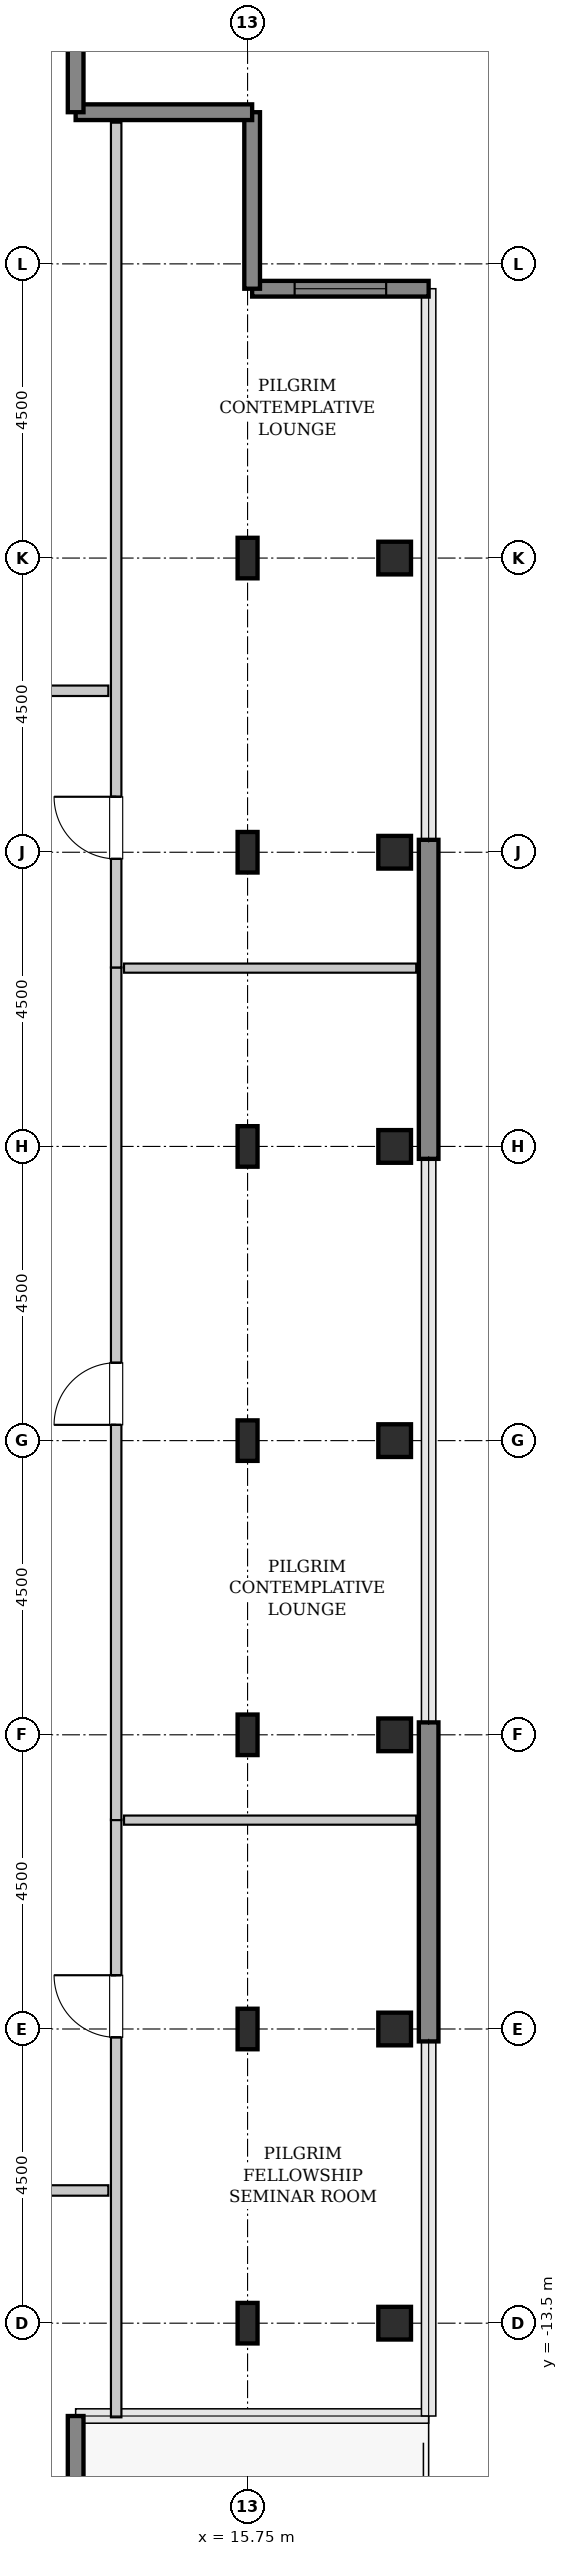
"""IFC4 building model, lengths in metres.
Left out: names, types, materials, properties, quantities, classifications, styles, units other than length and angle.
Written with IfcOpenShell. Run it as: python <this file> out.ifc"""

import sys

from ifc_helpers import new_model, si_unit, direction, frame, frame_2d, origin, origin_2d, place, context, subcontext, project, spatial, rectangle, hollow_rectangle, i_section, extrude, source, transform, mapped, element, fill, save


model = new_model("IFC4")
c1 = context("Model", 3, precision=1e-05, world=origin(), true_north=direction((0.0, 1.0)))
c2 = subcontext(c1, "Body", "Model", "MODEL_VIEW")
j1 = project(units=[si_unit("LENGTHUNIT", "METRE"), si_unit("PLANEANGLEUNIT", "RADIAN")], contexts=[c1])
p1 = place(None, origin())
s1 = spatial("IfcSite", under=j1, at=p1, CompositionType="ELEMENT")
p2 = place(p1, origin())
s2 = spatial("IfcBuilding", under=s1, at=p2, CompositionType="ELEMENT")
p3 = place(p2, frame((0.0, 0.0, 298.8)))
s3 = spatial("IfcBuildingStorey", under=s2, at=p3, CompositionType="ELEMENT", Elevation=298.8)
m1 = source(origin(), c2, "Body", "SweptSolid", [
    extrude(i_section(OverallWidth=0.305, OverallDepth=0.62, WebThickness=0.021, FlangeThickness=0.04, FilletRadius=0.027, at=origin_2d()), origin(), (0.0, 0.0, 1.0), 3.8),
])
for number, where, z_axis, x_axis in (
    (1, (15.75, -13.5, 0.0), (0.0, 0.0, 1.0), (1.0, 0.0, 0.0)),
    (2, (15.75, -9.0, 0.0), (0.0, 0.0, 1.0), (1.0, 0.0, 0.0)),
    (3, (15.75, -4.5, 0.0), (0.0, 0.0, 1.0), (1.0, 0.0, 0.0)),
    (4, (15.75, 0.0, 0.0), (0.0, 0.0, 1.0), (1.0, 0.0, 0.0)),
    (5, (15.75, 4.5, 0.0), (0.0, 0.0, 1.0), (1.0, 0.0, 0.0)),
    (6, (15.75, 9.0, 0.0), (0.0, 0.0, 1.0), (1.0, 0.0, 0.0)),
    (7, (15.75, 13.5, 0.0), (0.0, 0.0, 1.0), (1.0, 0.0, 0.0)),
):
    element("IfcColumn", number, at=place(p3, frame(where, z_axis=z_axis, x_axis=x_axis)), inside=s3, PredefinedType="COLUMN", context=c2, shape_type="MappedRepresentation", body=[
        mapped(m1, transform((0.0, 0.0, 0.0), x_axis=(1.0, 0.0, 0.0), y_axis=(0.0, 1.0, 0.0), z_axis=(0.0, 0.0, 1.0), scale=1.0)),
    ])
m2 = source(origin(), c2, "Body", "SweptSolid", [
    extrude(hollow_rectangle(XDim=0.5, YDim=0.5, WallThickness=0.025, InnerFilletRadius=0.025, OuterFilletRadius=0.05, at=origin_2d()), origin(), (0.0, 0.0, 1.0), 3.8),
])
for number, where, z_axis, x_axis in (
    (8, (18.0, -13.5, 0.0), (0.0, 0.0, 1.0), (1.0, 0.0, 0.0)),
    (9, (18.0, -9.0, 0.0), (0.0, 0.0, 1.0), (1.0, 0.0, 0.0)),
    (10, (18.0, -4.5, 0.0), (0.0, 0.0, 1.0), (1.0, 0.0, 0.0)),
    (11, (18.0, 0.0, 0.0), (0.0, 0.0, 1.0), (1.0, 0.0, 0.0)),
    (12, (18.0, 4.5, 0.0), (0.0, 0.0, 1.0), (1.0, 0.0, 0.0)),
    (13, (18.0, 9.0, 0.0), (0.0, 0.0, 1.0), (1.0, 0.0, 0.0)),
    (14, (18.0, 13.5, 0.0), (0.0, 0.0, 1.0), (1.0, 0.0, 0.0)),
):
    element("IfcColumn", number, at=place(p3, frame(where, z_axis=z_axis, x_axis=x_axis)), inside=s3, PredefinedType="COLUMN", context=c2, shape_type="MappedRepresentation", body=[
        mapped(m2, transform((0.0, 0.0, 0.0), x_axis=(1.0, 0.0, 0.0), y_axis=(0.0, 1.0, 0.0), z_axis=(0.0, 0.0, 1.0), scale=1.0)),
    ])
m3 = source(origin(), c2, "Body", "SweptSolid", [
    extrude(rectangle(XDim=4.88, YDim=0.3, at=frame_2d((2.44, 0.0))), origin(), (0.0, 0.0, 1.0), 3.55),
])
for number, where, z_axis, x_axis in (
    (15, (18.52, -9.19, 0.0), (0.0, 0.0, 1.0), (0.0, 1.0, 0.0)),
    (16, (18.52, 4.31, 0.0), (0.0, 0.0, 1.0), (0.0, 1.0, 0.0)),
):
    element("IfcWall", number, at=place(p3, frame(where, z_axis=z_axis, x_axis=x_axis)), inside=s3, PredefinedType="SHEAR", context=c2, shape_type="MappedRepresentation", body=[
        mapped(m3, transform((0.0, 0.0, 0.0), x_axis=(1.0, 0.0, 0.0), y_axis=(0.0, 1.0, 0.0), z_axis=(0.0, 0.0, 1.0), scale=1.0)),
    ])
m4 = source(origin(), c2, "Body", "SweptSolid", [
    extrude(rectangle(XDim=2.7, YDim=0.24, at=frame_2d((1.35, 0.0))), origin(), (0.0, 0.0, 1.0), 3.55),
])
p4 = place(p3, frame((13.12, -17.62, 0.0), z_axis=(0.0, 0.0, 1.0), x_axis=(0.0, 1.0, 0.0)))
e17 = element("IfcWall", 17, at=p4, inside=s3, PredefinedType="SHEAR", context=c2, shape_type="MappedRepresentation", body=[
    mapped(m4, transform((0.0, 0.0, 0.0), x_axis=(1.0, 0.0, 0.0), y_axis=(0.0, 1.0, 0.0), z_axis=(0.0, 0.0, 1.0), scale=1.0)),
])
m5 = source(origin(), c2, "Body", "SweptSolid", [
    extrude(rectangle(XDim=2.7, YDim=0.24, at=frame_2d((1.35, 0.0))), origin(), (0.0, 0.0, 1.0), 3.55),
])
p5 = place(p3, frame((18.52, 17.62, 0.0), z_axis=(0.0, 0.0, 1.0), x_axis=(-1.0, 0.0, 0.0)))
e18 = element("IfcWall", 18, at=p5, inside=s3, PredefinedType="SHEAR", context=c2, shape_type="MappedRepresentation", body=[
    mapped(m5, transform((0.0, 0.0, 0.0), x_axis=(1.0, 0.0, 0.0), y_axis=(0.0, 1.0, 0.0), z_axis=(0.0, 0.0, 1.0), scale=1.0)),
])
p6 = place(p5, frame((0.65, 0.0, 0.85)))
e19 = element("IfcOpeningElement", 19, at=p6, cuts=e18, PredefinedType="OPENING", context=c2, shape_type="SweptSolid", body=[
    extrude(rectangle(XDim=1.4, YDim=1.8, at=frame_2d((0.7, 0.9))), frame((0.0, 0.13, 0.0), z_axis=(0.0, -1.0, 0.0), x_axis=(1.0, 0.0, 0.0)), (0.0, 0.0, 1.0), 0.26),
])
for number, where, z_axis, x_axis in (
    (20, (15.82, 17.62, 0.0), (0.0, 0.0, 1.0), (0.0, 1.0, 0.0)),
    (21, (15.82, 20.32, 0.0), (0.0, 0.0, 1.0), (-1.0, 0.0, 0.0)),
    (22, (13.12, 20.32, 0.0), (0.0, 0.0, 1.0), (0.0, 1.0, 0.0)),
):
    element("IfcWall", number, at=place(p3, frame(where, z_axis=z_axis, x_axis=x_axis)), inside=s3, PredefinedType="SHEAR", context=c2, shape_type="MappedRepresentation", body=[
        mapped(m5, transform((0.0, 0.0, 0.0), x_axis=(1.0, 0.0, 0.0), y_axis=(0.0, 1.0, 0.0), z_axis=(0.0, 0.0, 1.0), scale=1.0)),
    ])
m6 = source(origin(), c2, "Body", "SweptSolid", [
    extrude(rectangle(XDim=9.145, YDim=0.16, at=frame_2d((4.573, 0.0))), origin(), (0.0, 0.0, 1.0), 3.535),
])
p7 = place(p3, frame((13.74, -14.94, 0.0), z_axis=(0.0, 0.0, 1.0), x_axis=(0.0, 1.0, 0.0)))
e23 = element("IfcWall", 23, at=p7, inside=s3, PredefinedType="PARTITIONING", context=c2, shape_type="MappedRepresentation", body=[
    mapped(m6, transform((0.0, 0.0, 0.0), x_axis=(1.0, 0.0, 0.0), y_axis=(0.0, 1.0, 0.0), z_axis=(0.0, 0.0, 1.0), scale=1.0)),
])
p8 = place(p7, frame((5.812, 0.0, 0.0)))
e24 = element("IfcOpeningElement", 24, at=p8, cuts=e23, PredefinedType="OPENING", context=c2, shape_type="SweptSolid", body=[
    extrude(rectangle(XDim=0.95, YDim=2.1, at=frame_2d((0.475, 1.05))), frame((0.0, 0.09, 0.0), z_axis=(0.0, -1.0, 0.0), x_axis=(1.0, 0.0, 0.0)), (0.0, 0.0, 1.0), 0.18),
])
m7 = source(origin(), c2, "Body", "SweptSolid", [
    extrude(rectangle(XDim=4.47, YDim=0.14, at=frame_2d((2.235, 0.0))), origin(), (0.0, 0.0, 1.0), 3.535),
])
p9 = place(p3, frame((13.86, -5.805, 0.0), z_axis=(0.0, 0.0, 1.0), x_axis=(1.0, 0.0, 0.0)))
e25 = element("IfcWall", 25, at=p9, inside=s3, PredefinedType="PARTITIONING", context=c2, shape_type="MappedRepresentation", body=[
    mapped(m7, transform((0.0, 0.0, 0.0), x_axis=(1.0, 0.0, 0.0), y_axis=(0.0, 1.0, 0.0), z_axis=(0.0, 0.0, 1.0), scale=1.0)),
])
m8 = source(origin(), c2, "Body", "SweptSolid", [
    extrude(rectangle(XDim=13.042, YDim=0.16, at=frame_2d((6.521, 0.0))), origin(), (0.0, 0.0, 1.0), 3.535),
])
p10 = place(p3, frame((13.74, -5.805, 0.0), z_axis=(0.0, 0.0, 1.0), x_axis=(0.0, 1.0, 0.0)))
e26 = element("IfcWall", 26, at=p10, inside=s3, PredefinedType="PARTITIONING", context=c2, shape_type="MappedRepresentation", body=[
    mapped(m8, transform((0.0, 0.0, 0.0), x_axis=(1.0, 0.0, 0.0), y_axis=(0.0, 1.0, 0.0), z_axis=(0.0, 0.0, 1.0), scale=1.0)),
])
p11 = place(p10, frame((6.046, 0.0, 0.0)))
e27 = element("IfcOpeningElement", 27, at=p11, cuts=e26, PredefinedType="OPENING", context=c2, shape_type="SweptSolid", body=[
    extrude(rectangle(XDim=0.95, YDim=2.1, at=frame_2d((0.475, 1.05))), frame((0.0, 0.09, 0.0), z_axis=(0.0, -1.0, 0.0), x_axis=(1.0, 0.0, 0.0)), (0.0, 0.0, 1.0), 0.18),
])
p12 = place(p3, frame((13.86, 7.228, 0.0), z_axis=(0.0, 0.0, 1.0), x_axis=(1.0, 0.0, 0.0)))
e28 = element("IfcWall", 28, at=p12, inside=s3, PredefinedType="PARTITIONING", context=c2, shape_type="MappedRepresentation", body=[
    mapped(m7, transform((0.0, 0.0, 0.0), x_axis=(1.0, 0.0, 0.0), y_axis=(0.0, 1.0, 0.0), z_axis=(0.0, 0.0, 1.0), scale=1.0)),
])
m9 = source(origin(), c2, "Body", "SweptSolid", [
    extrude(rectangle(XDim=12.922, YDim=0.16, at=frame_2d((6.461, 0.0))), origin(), (0.0, 0.0, 1.0), 3.535),
])
p13 = place(p3, frame((13.74, 7.238, 0.0), z_axis=(0.0, 0.0, 1.0), x_axis=(0.0, 1.0, 0.0)))
e29 = element("IfcWall", 29, at=p13, inside=s3, PredefinedType="PARTITIONING", context=c2, shape_type="MappedRepresentation", body=[
    mapped(m9, transform((0.0, 0.0, 0.0), x_axis=(1.0, 0.0, 0.0), y_axis=(0.0, 1.0, 0.0), z_axis=(0.0, 0.0, 1.0), scale=1.0)),
])
p14 = place(p13, frame((1.661, 0.0, 0.0)))
e30 = element("IfcOpeningElement", 30, at=p14, cuts=e29, PredefinedType="OPENING", context=c2, shape_type="SweptSolid", body=[
    extrude(rectangle(XDim=0.95, YDim=2.1, at=frame_2d((0.475, 1.05))), frame((0.0, 0.09, 0.0), z_axis=(0.0, -1.0, 0.0), x_axis=(1.0, 0.0, 0.0)), (0.0, 0.0, 1.0), 0.18),
])
m10 = source(origin(), c2, "Body", "SweptSolid", [
    extrude(rectangle(XDim=5.225, YDim=0.16, at=frame_2d((2.613, 0.0))), origin(), (0.0, 0.0, 1.0), 3.535),
])
p15 = place(p3, frame((8.395, 11.47, 0.0), z_axis=(0.0, 0.0, 1.0), x_axis=(1.0, 0.0, 0.0)))
e31 = element("IfcWall", 31, at=p15, inside=s3, PredefinedType="PARTITIONING", context=c2, shape_type="MappedRepresentation", body=[
    mapped(m10, transform((0.0, 0.0, 0.0), x_axis=(1.0, 0.0, 0.0), y_axis=(0.0, 1.0, 0.0), z_axis=(0.0, 0.0, 1.0), scale=1.0)),
])
p16 = place(p15, frame((2.137, 0.0, 0.0)))
e32 = element("IfcOpeningElement", 32, at=p16, cuts=e31, PredefinedType="OPENING", context=c2, shape_type="SweptSolid", body=[
    extrude(rectangle(XDim=0.95, YDim=2.1, at=frame_2d((0.475, 1.05))), frame((0.0, 0.09, 0.0), z_axis=(0.0, -1.0, 0.0), x_axis=(1.0, 0.0, 0.0)), (0.0, 0.0, 1.0), 0.18),
])
m11 = source(origin(), c2, "Body", "SweptSolid", [
    extrude(rectangle(XDim=7.225, YDim=0.16, at=frame_2d((3.613, 0.0))), origin(), (0.0, 0.0, 1.0), 3.535),
])
p17 = place(p3, frame((6.395, -11.47, 0.0), z_axis=(0.0, 0.0, 1.0), x_axis=(1.0, 0.0, 0.0)))
e33 = element("IfcWall", 33, at=p17, inside=s3, PredefinedType="PARTITIONING", context=c2, shape_type="MappedRepresentation", body=[
    mapped(m11, transform((0.0, 0.0, 0.0), x_axis=(1.0, 0.0, 0.0), y_axis=(0.0, 1.0, 0.0), z_axis=(0.0, 0.0, 1.0), scale=1.0)),
])
p18 = place(p17, frame((3.137, 0.0, 0.0)))
e34 = element("IfcOpeningElement", 34, at=p18, cuts=e33, PredefinedType="OPENING", context=c2, shape_type="SweptSolid", body=[
    extrude(rectangle(XDim=0.95, YDim=2.1, at=frame_2d((0.475, 1.05))), frame((0.0, 0.09, 0.0), z_axis=(0.0, -1.0, 0.0), x_axis=(1.0, 0.0, 0.0)), (0.0, 0.0, 1.0), 0.18),
])
m12 = source(origin(), c2, "Body", "SweptSolid", [
    extrude(rectangle(XDim=1.4, YDim=1.8, at=frame_2d((0.7, 0.9))), frame((0.0, 0.03, 0.0), z_axis=(0.0, -1.0, 0.0), x_axis=(1.0, 0.0, 0.0)), (0.0, 0.0, 1.0), 0.06),
])
p19 = place(p6, origin())
e35 = element("IfcWindow", 35, at=p19, inside=s3, PartitioningType="SINGLE_PANEL", PredefinedType="WINDOW", context=c2, shape_type="MappedRepresentation", body=[
    mapped(m12, transform((0.0, 0.0, 0.0), x_axis=(1.0, 0.0, 0.0), y_axis=(0.0, 1.0, 0.0), z_axis=(0.0, 0.0, 1.0), scale=1.0)),
])
fill(e19, e35)
m13 = source(origin(), c2, "Body", "SweptSolid", [
    extrude(rectangle(XDim=0.95, YDim=2.1, at=frame_2d((0.475, 1.05))), frame((0.0, 0.025, 0.0), z_axis=(0.0, -1.0, 0.0), x_axis=(1.0, 0.0, 0.0)), (0.0, 0.0, 1.0), 0.05),
])
p20 = place(p8, origin())
e36 = element("IfcDoor", 36, at=p20, inside=s3, OperationType="SINGLE_SWING_RIGHT", PredefinedType="DOOR", context=c2, shape_type="MappedRepresentation", body=[
    mapped(m13, transform((0.0, 0.0, 0.0), x_axis=(1.0, 0.0, 0.0), y_axis=(0.0, 1.0, 0.0), z_axis=(0.0, 0.0, 1.0), scale=1.0)),
])
fill(e24, e36)
p21 = place(p11, origin())
e37 = element("IfcDoor", 37, at=p21, inside=s3, OperationType="SINGLE_SWING_LEFT", PredefinedType="DOOR", context=c2, shape_type="MappedRepresentation", body=[
    mapped(m13, transform((0.0, 0.0, 0.0), x_axis=(1.0, 0.0, 0.0), y_axis=(0.0, 1.0, 0.0), z_axis=(0.0, 0.0, 1.0), scale=1.0)),
])
fill(e27, e37)
p22 = place(p14, origin())
e38 = element("IfcDoor", 38, at=p22, inside=s3, OperationType="SINGLE_SWING_RIGHT", PredefinedType="DOOR", context=c2, shape_type="MappedRepresentation", body=[
    mapped(m13, transform((0.0, 0.0, 0.0), x_axis=(1.0, 0.0, 0.0), y_axis=(0.0, 1.0, 0.0), z_axis=(0.0, 0.0, 1.0), scale=1.0)),
])
fill(e30, e38)
save(model, sys.argv[1])
